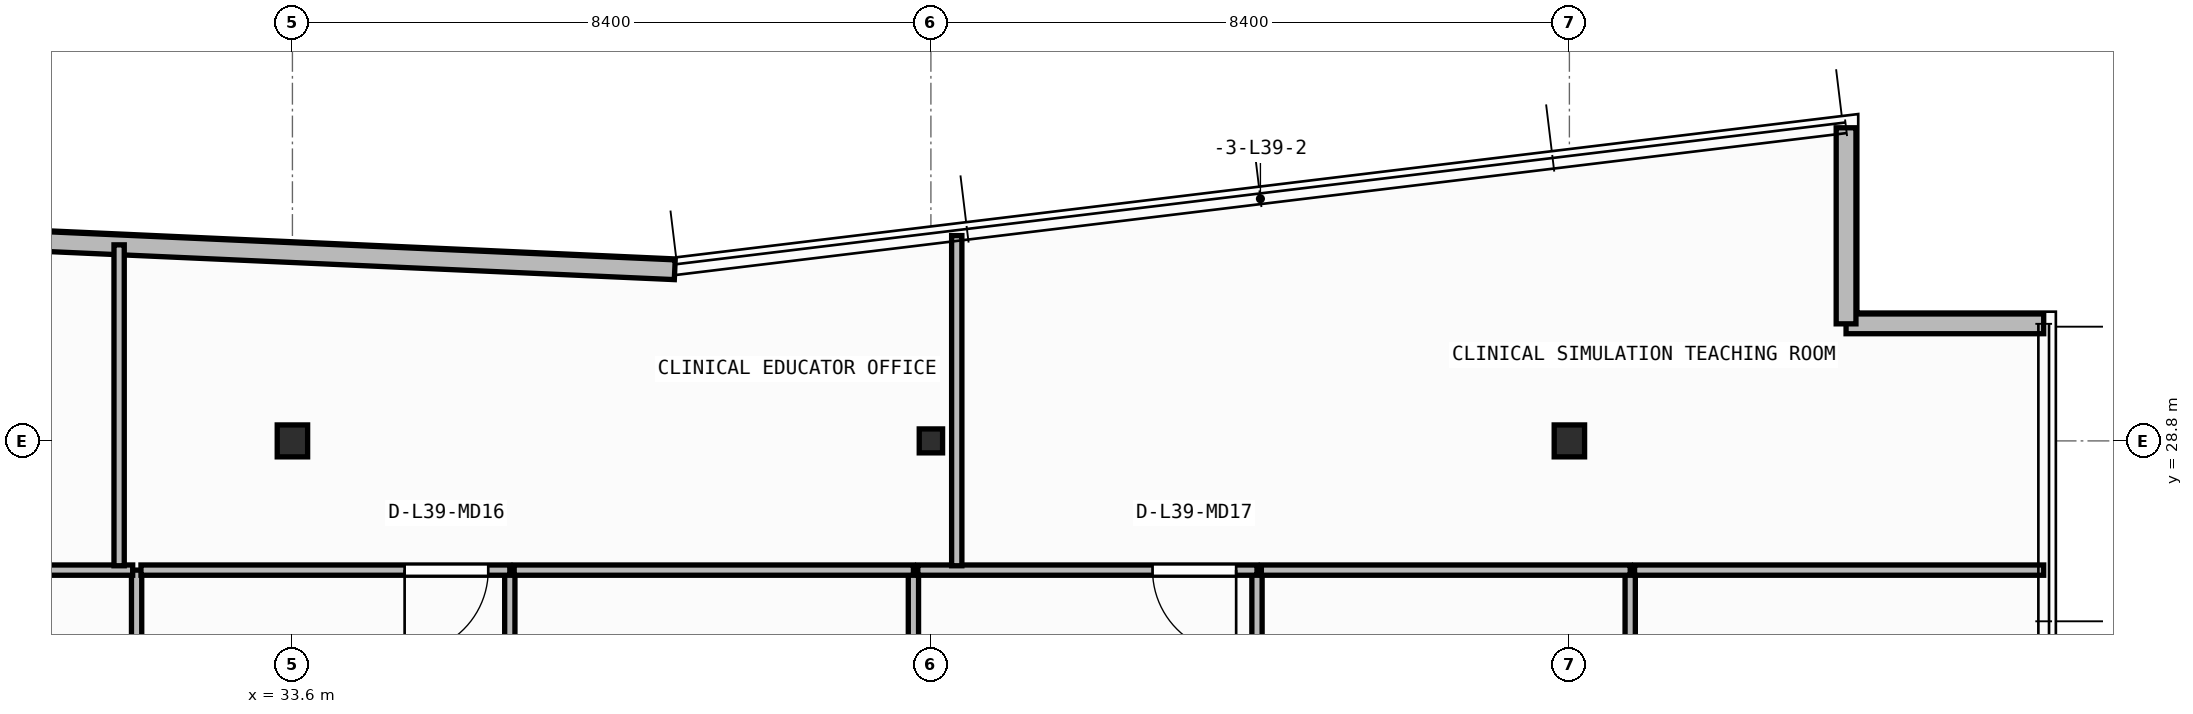
"""IFC4 building model, lengths in metres.
Left out: names, types, materials, properties, quantities, classifications, styles, units other than length and angle.
Written with IfcOpenShell. Run it as: python <this file> out.ifc"""

import sys

from ifc_helpers import new_model, si_unit, direction, frame, frame_2d, origin, origin_2d, place, context, subcontext, project, spatial, rectangle, i_section, extrude, element, fill, save


model = new_model("IFC4")
c1 = context("Model", 3, precision=1e-05, world=origin(), true_north=direction((0.0, 1.0)))
c2 = subcontext(c1, "Body", "Model", "MODEL_VIEW")
j1 = project(units=[si_unit("LENGTHUNIT", "METRE"), si_unit("PLANEANGLEUNIT", "RADIAN")], contexts=[c1])
p1 = place(None, origin())
s1 = spatial("IfcSite", under=j1, at=p1, CompositionType="ELEMENT")
p2 = place(p1, origin())
s2 = spatial("IfcBuilding", under=s1, at=p2, CompositionType="ELEMENT")
p3 = place(p2, frame((0.0, 0.0, 158.65)))
s3 = spatial("IfcBuildingStorey", under=s2, at=p3, CompositionType="ELEMENT", Elevation=158.65)
p4 = place(p3, frame((33.6, 28.8, 0.0), z_axis=(0.0, 0.0, 1.0), x_axis=(1.0, 0.0, 0.0)))
e1 = element("IfcColumn", 1, at=p4, inside=s3, PredefinedType="COLUMN", context=c2, shape_type="SweptSolid", body=[
    extrude(i_section(OverallWidth=0.4, OverallDepth=0.42, WebThickness=0.025, FlangeThickness=0.04, at=origin_2d()), origin(), (0.0, 0.0, 1.0), 3.95),
])
p5 = place(p3, frame((42.0, 28.8, 0.0), z_axis=(0.0, 0.0, 1.0), x_axis=(1.0, 0.0, 0.0)))
e2 = element("IfcColumn", 2, at=p5, inside=s3, PredefinedType="COLUMN", context=c2, shape_type="SweptSolid", body=[
    extrude(i_section(OverallWidth=0.307, OverallDepth=0.315, WebThickness=0.012, FlangeThickness=0.019, FilletRadius=0.017, at=origin_2d()), origin(), (0.0, 0.0, 1.0), 3.95),
])
p6 = place(p3, frame((50.4, 28.8, 0.0), z_axis=(0.0, 0.0, 1.0), x_axis=(1.0, 0.0, 0.0)))
e3 = element("IfcColumn", 3, at=p6, inside=s3, PredefinedType="COLUMN", context=c2, shape_type="SweptSolid", body=[
    extrude(i_section(OverallWidth=0.4, OverallDepth=0.42, WebThickness=0.025, FlangeThickness=0.04, at=origin_2d()), origin(), (0.0, 0.0, 1.0), 3.95),
])
p7 = place(p3, frame((56.64, 30.34, 0.0), z_axis=(0.0, 0.0, 1.0), x_axis=(-1.0, 0.0, 0.0)))
e4 = element("IfcWall", 4, at=p7, inside=s3, PredefinedType="STANDARD", context=c2, shape_type="SweptSolid", body=[
    extrude(rectangle(XDim=2.6, YDim=0.26, at=frame_2d((1.3, 0.0))), origin(), (0.0, 0.0, 1.0), 3.71),
])
p8 = place(p3, frame((54.04, 30.34, 0.0), z_axis=(0.0, 0.0, 1.0), x_axis=(0.0, 1.0, 0.0)))
e5 = element("IfcWall", 5, at=p8, inside=s3, PredefinedType="STANDARD", context=c2, shape_type="SweptSolid", body=[
    extrude(rectangle(XDim=2.579, YDim=0.26, at=frame_2d((1.29, 0.0))), origin(), (0.0, 0.0, 1.0), 3.71),
])
p9 = place(p3, frame((38.63, 31.052, 0.0), z_axis=(0.0, 0.0, 1.0), x_axis=(-0.998996592956, 0.044786239663, 0.0)))
e6 = element("IfcWall", 6, at=p9, inside=s3, PredefinedType="STANDARD", context=c2, shape_type="SweptSolid", body=[
    extrude(rectangle(XDim=14.827, YDim=0.26, at=frame_2d((7.414, 0.0))), origin(), (0.0, 0.0, 1.0), 3.71),
])
p10 = place(p9, frame((9.882, 0.0, 0.9)))
e7 = element("IfcOpeningElement", 7, at=p10, cuts=e6, PredefinedType="OPENING", context=c2, shape_type="SweptSolid", body=[
    extrude(rectangle(XDim=2.4, YDim=1.65, at=frame_2d((1.2, 0.825))), frame((0.0, 0.14, 0.0), z_axis=(0.0, -1.0, 0.0), x_axis=(1.0, 0.0, 0.0)), (0.0, 0.0, 1.0), 0.28),
])
p11 = place(p3, frame((31.55, 23.802, 0.0), z_axis=(0.0, 0.0, 1.0), x_axis=(0.0, 1.0, 0.0)))
e8 = element("IfcWall", 8, at=p11, inside=s3, PredefinedType="PARTITIONING", context=c2, shape_type="SweptSolid", body=[
    extrude(rectangle(XDim=3.298, YDim=0.135, at=frame_2d((1.649, 0.0))), origin(), (0.0, 0.0, 1.0), 3.71),
])
p12 = place(p3, frame((31.499, 27.1, 0.0), z_axis=(0.0, 0.0, 1.0), x_axis=(-1.0, 0.0, 0.0)))
e9 = element("IfcWall", 9, at=p12, inside=s3, PredefinedType="PARTITIONING", context=c2, shape_type="SweptSolid", body=[
    extrude(rectangle(XDim=4.411, YDim=0.135, at=frame_2d((2.206, 0.0))), origin(), (0.0, 0.0, 1.0), 3.71),
])
p13 = place(p3, frame((36.46, 20.715, 0.0), z_axis=(0.0, 0.0, 1.0), x_axis=(0.0, 1.0, 0.0)))
e10 = element("IfcWall", 10, at=p13, inside=s3, PredefinedType="PARTITIONING", context=c2, shape_type="SweptSolid", body=[
    extrude(rectangle(XDim=6.385, YDim=0.135, at=frame_2d((3.192, 0.0))), origin(), (0.0, 0.0, 1.0), 3.71),
])
p14 = place(p3, frame((36.46, 27.1, 0.0), z_axis=(0.0, 0.0, 1.0), x_axis=(-1.0, 0.0, 0.0)))
e11 = element("IfcWall", 11, at=p14, inside=s3, PredefinedType="PARTITIONING", context=c2, shape_type="SweptSolid", body=[
    extrude(rectangle(XDim=4.853, YDim=0.135, at=frame_2d((2.426, 0.0))), origin(), (0.0, 0.0, 1.0), 3.71),
])
p15 = place(p14, frame((0.284, 0.0, 0.0)))
e12 = element("IfcOpeningElement", 12, at=p15, cuts=e11, PredefinedType="OPENING", context=c2, shape_type="SweptSolid", body=[
    extrude(rectangle(XDim=1.1, YDim=2.1, at=frame_2d((0.55, 1.05))), frame((0.0, 0.077, 0.0), z_axis=(0.0, -1.0, 0.0), x_axis=(1.0, 0.0, 0.0)), (0.0, 0.0, 1.0), 0.155),
])
p16 = place(p3, frame((41.77, 20.715, 0.0), z_axis=(0.0, 0.0, 1.0), x_axis=(0.0, 1.0, 0.0)))
e13 = element("IfcWall", 13, at=p16, inside=s3, PredefinedType="PARTITIONING", context=c2, shape_type="SweptSolid", body=[
    extrude(rectangle(XDim=6.385, YDim=0.135, at=frame_2d((3.192, 0.0))), origin(), (0.0, 0.0, 1.0), 3.152),
])
p17 = place(p3, frame((41.77, 27.1, 0.0), z_axis=(0.0, 0.0, 1.0), x_axis=(-1.0, 0.0, 0.0)))
e14 = element("IfcWall", 14, at=p17, inside=s3, PredefinedType="PARTITIONING", context=c2, shape_type="SweptSolid", body=[
    extrude(rectangle(XDim=5.252, YDim=0.135, at=frame_2d((2.626, 0.0))), origin(), (0.0, 0.0, 1.0), 3.71),
])
p18 = place(p3, frame((46.29, 20.715, 0.0), z_axis=(0.0, 0.0, 1.0), x_axis=(0.0, 1.0, 0.0)))
e15 = element("IfcWall", 15, at=p18, inside=s3, PredefinedType="PARTITIONING", context=c2, shape_type="SweptSolid", body=[
    extrude(rectangle(XDim=6.385, YDim=0.135, at=frame_2d((3.192, 0.0))), origin(), (0.0, 0.0, 1.0), 3.71),
])
p19 = place(p3, frame((46.29, 27.1, 0.0), z_axis=(0.0, 0.0, 1.0), x_axis=(-1.0, 0.0, 0.0)))
e16 = element("IfcWall", 16, at=p19, inside=s3, PredefinedType="PARTITIONING", context=c2, shape_type="SweptSolid", body=[
    extrude(rectangle(XDim=4.463, YDim=0.135, at=frame_2d((2.231, 0.0))), origin(), (0.0, 0.0, 1.0), 3.71),
])
p20 = place(p19, frame((0.274, 0.0, 0.0)))
e17 = element("IfcOpeningElement", 17, at=p20, cuts=e16, PredefinedType="OPENING", context=c2, shape_type="SweptSolid", body=[
    extrude(rectangle(XDim=1.1, YDim=2.1, at=frame_2d((0.55, 1.05))), frame((0.0, 0.077, 0.0), z_axis=(0.0, -1.0, 0.0), x_axis=(1.0, 0.0, 0.0)), (0.0, 0.0, 1.0), 0.155),
])
p21 = place(p3, frame((51.2, 20.715, 0.0), z_axis=(0.0, 0.0, 1.0), x_axis=(0.0, 1.0, 0.0)))
e18 = element("IfcWall", 18, at=p21, inside=s3, PredefinedType="PARTITIONING", context=c2, shape_type="SweptSolid", body=[
    extrude(rectangle(XDim=6.385, YDim=0.135, at=frame_2d((3.192, 0.0))), origin(), (0.0, 0.0, 1.0), 3.71),
])
p22 = place(p3, frame((51.2, 27.1, 0.0), z_axis=(0.0, 0.0, 1.0), x_axis=(-1.0, 0.0, 0.0)))
e19 = element("IfcWall", 19, at=p22, inside=s3, PredefinedType="PARTITIONING", context=c2, shape_type="SweptSolid", body=[
    extrude(rectangle(XDim=4.853, YDim=0.135, at=frame_2d((2.426, 0.0))), origin(), (0.0, 0.0, 1.0), 3.71),
])
p23 = place(p3, frame((56.64, 27.1, 0.0), z_axis=(0.0, 0.0, 1.0), x_axis=(-1.0, 0.0, 0.0)))
e20 = element("IfcWall", 20, at=p23, inside=s3, PredefinedType="PARTITIONING", context=c2, shape_type="SweptSolid", body=[
    extrude(rectangle(XDim=5.382, YDim=0.135, at=frame_2d((2.691, 0.0))), origin(), (0.0, 0.0, 1.0), 3.71),
])
p24 = place(p3, frame((31.32, 27.157, 0.0), z_axis=(0.0, 0.0, 1.0), x_axis=(0.0, 1.0, 0.0)))
e21 = element("IfcWall", 21, at=p24, inside=s3, PredefinedType="PARTITIONING", context=c2, shape_type="SweptSolid", body=[
    extrude(rectangle(XDim=4.222, YDim=0.135, at=frame_2d((2.111, 0.0))), origin(), (0.0, 0.0, 1.0), 3.71),
])
p25 = place(p3, frame((42.34, 27.157, 0.0), z_axis=(0.0, 0.0, 1.0), x_axis=(0.0, 1.0, 0.0)))
e22 = element("IfcWall", 22, at=p25, inside=s3, PredefinedType="PARTITIONING", context=c2, shape_type="SweptSolid", body=[
    extrude(rectangle(XDim=4.344, YDim=0.135, at=frame_2d((2.172, 0.0))), origin(), (0.0, 0.0, 1.0), 3.152),
])
p26 = place(p15, origin())
e23 = element("IfcDoor", 23, at=p26, inside=s3, OperationType="SINGLE_SWING_RIGHT", PredefinedType="DOOR", context=c2, shape_type="SweptSolid", body=[
    extrude(rectangle(XDim=1.1, YDim=2.1, at=frame_2d((0.55, 1.05))), frame((0.0, 0.025, 0.0), z_axis=(0.0, -1.0, 0.0), x_axis=(1.0, 0.0, 0.0)), (0.0, 0.0, 1.0), 0.05),
])
fill(e12, e23)
p27 = place(p20, origin())
e24 = element("IfcDoor", 24, at=p27, inside=s3, OperationType="SINGLE_SWING_LEFT", PredefinedType="DOOR", context=c2, shape_type="SweptSolid", body=[
    extrude(rectangle(XDim=1.1, YDim=2.1, at=frame_2d((0.55, 1.05))), frame((0.0, 0.025, 0.0), z_axis=(0.0, -1.0, 0.0), x_axis=(1.0, 0.0, 0.0)), (0.0, 0.0, 1.0), 0.05),
])
fill(e17, e24)
save(model, sys.argv[1])
